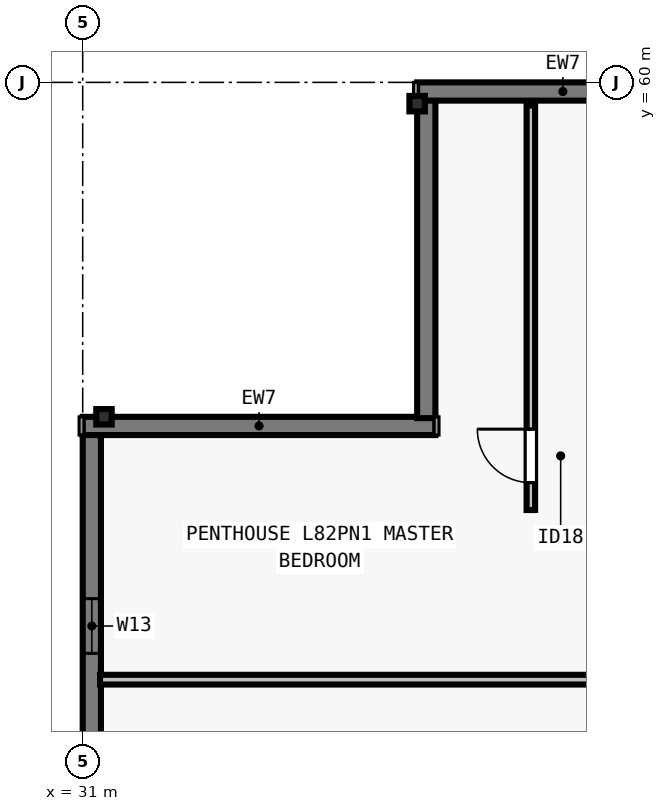
"""IFC4 building model, lengths in metres.
Left out: names, types, materials, properties, quantities, classifications, styles, units other than length and angle.
Written with IfcOpenShell. Run it as: python <this file> out.ifc"""

import sys

from ifc_helpers import new_model, si_unit, direction, frame, frame_2d, origin, origin_2d, place, context, subcontext, project, spatial, rectangle, i_section, extrude, element, fill, save


model = new_model("IFC4")
c1 = context("Model", 3, precision=1e-05, world=origin(), true_north=direction((0.0, 1.0)))
c2 = subcontext(c1, "Body", "Model", "MODEL_VIEW")
j1 = project(units=[si_unit("LENGTHUNIT", "METRE"), si_unit("PLANEANGLEUNIT", "RADIAN")], contexts=[c1])
p1 = place(None, origin())
s1 = spatial("IfcSite", under=j1, at=p1, CompositionType="ELEMENT")
p2 = place(p1, origin())
s2 = spatial("IfcBuilding", under=s1, at=p2, CompositionType="ELEMENT")
p3 = place(p2, frame((0.0, 0.0, 298.0)))
s3 = spatial("IfcBuildingStorey", under=s2, at=p3, CompositionType="ELEMENT", Elevation=298.0)
for number, where, z_axis, x_axis in (
    (1, (36.5, 59.65, 0.0), (0.0, 0.0, 1.0), (1.0, 0.0, 0.0)),
    (2, (31.35, 54.5, 0.0), (0.0, 0.0, 1.0), (0.0, 1.0, 0.0)),
):
    element("IfcColumn", number, at=place(p3, frame(where, z_axis=z_axis, x_axis=x_axis)), inside=s3, PredefinedType="COLUMN", context=c2, shape_type="SweptSolid", body=[
        extrude(i_section(OverallWidth=0.254, OverallDepth=0.254, WebThickness=0.009, FlangeThickness=0.014, FilletRadius=0.013, at=origin_2d()), origin(), (0.0, 0.0, 1.0), 3.5),
    ])
p4 = place(p3, frame((31.15, 23.5, 0.0), z_axis=(0.0, 0.0, 1.0), x_axis=(0.0, 1.0, 0.0)))
e3 = element("IfcWall", 3, at=p4, inside=s3, PredefinedType="SOLIDWALL", context=c2, shape_type="SweptSolid", body=[
    extrude(rectangle(XDim=30.722, YDim=0.3, at=frame_2d((15.361, 0.0))), origin(), (0.0, 0.0, 1.0), 3.29),
])
p5 = place(p4, frame((4.944, 0.0, 0.8)))
e4 = element("IfcOpeningElement", 4, at=p5, cuts=e3, PredefinedType="OPENING", context=c2, shape_type="SweptSolid", body=[
    extrude(rectangle(XDim=1.65, YDim=1.758, at=frame_2d((0.825, 0.879))), frame((0.0, 0.16, 0.0), z_axis=(0.0, -1.0, 0.0), x_axis=(1.0, 0.0, 0.0)), (0.0, 0.0, 1.0), 0.32),
])
p6 = place(p4, frame((7.355, 0.0, 0.8)))
e5 = element("IfcOpeningElement", 5, at=p6, cuts=e3, PredefinedType="OPENING", context=c2, shape_type="SweptSolid", body=[
    extrude(rectangle(XDim=2.0, YDim=1.758, at=frame_2d((1.0, 0.879))), frame((0.0, 0.16, 0.0), z_axis=(0.0, -1.0, 0.0), x_axis=(1.0, 0.0, 0.0)), (0.0, 0.0, 1.0), 0.32),
])
p7 = place(p4, frame((12.617, 0.0, 0.8)))
e6 = element("IfcOpeningElement", 6, at=p7, cuts=e3, PredefinedType="OPENING", context=c2, shape_type="SweptSolid", body=[
    extrude(rectangle(XDim=1.65, YDim=1.758, at=frame_2d((0.825, 0.879))), frame((0.0, 0.16, 0.0), z_axis=(0.0, -1.0, 0.0), x_axis=(1.0, 0.0, 0.0)), (0.0, 0.0, 1.0), 0.32),
])
p8 = place(p4, frame((16.28, 0.0, 0.8)))
e7 = element("IfcOpeningElement", 7, at=p8, cuts=e3, PredefinedType="OPENING", context=c2, shape_type="SweptSolid", body=[
    extrude(rectangle(XDim=2.0, YDim=1.758, at=frame_2d((1.0, 0.879))), frame((0.0, 0.16, 0.0), z_axis=(0.0, -1.0, 0.0), x_axis=(1.0, 0.0, 0.0)), (0.0, 0.0, 1.0), 0.32),
])
p9 = place(p4, frame((21.142, 0.0, 0.8)))
e8 = element("IfcOpeningElement", 8, at=p9, cuts=e3, PredefinedType="OPENING", context=c2, shape_type="SweptSolid", body=[
    extrude(rectangle(XDim=1.65, YDim=1.758, at=frame_2d((0.825, 0.879))), frame((0.0, 0.16, 0.0), z_axis=(0.0, -1.0, 0.0), x_axis=(1.0, 0.0, 0.0)), (0.0, 0.0, 1.0), 0.32),
])
p10 = place(p4, frame((27.11, 0.0, 0.8)))
e9 = element("IfcOpeningElement", 9, at=p10, cuts=e3, PredefinedType="OPENING", context=c2, shape_type="SweptSolid", body=[
    extrude(rectangle(XDim=0.9, YDim=1.75, at=frame_2d((0.45, 0.875))), frame((0.0, 0.16, 0.0), z_axis=(0.0, -1.0, 0.0), x_axis=(1.0, 0.0, 0.0)), (0.0, 0.0, 1.0), 0.32),
])
p11 = place(p3, frame((31.0, 54.35, 0.0), z_axis=(0.0, 0.0, 1.0), x_axis=(1.0, 0.0, 0.0)))
e10 = element("IfcWall", 10, at=p11, inside=s3, PredefinedType="SOLIDWALL", context=c2, shape_type="SweptSolid", body=[
    extrude(rectangle(XDim=5.8, YDim=0.3, at=frame_2d((2.9, 0.0))), origin(), (0.0, 0.0, 1.0), 3.29),
])
p12 = place(p3, frame((36.65, 54.478, 0.0), z_axis=(0.0, 0.0, 1.0), x_axis=(0.0, 1.0, 0.0)))
e11 = element("IfcWall", 11, at=p12, inside=s3, PredefinedType="SOLIDWALL", context=c2, shape_type="SweptSolid", body=[
    extrude(rectangle(XDim=5.244, YDim=0.3, at=frame_2d((2.622, 0.0))), origin(), (0.0, 0.0, 1.0), 3.29),
])
p13 = place(p3, frame((36.5, 59.85, 0.0), z_axis=(0.0, 0.0, 1.0), x_axis=(1.0, 0.0, 0.0)))
e12 = element("IfcWall", 12, at=p13, inside=s3, PredefinedType="SOLIDWALL", context=c2, shape_type="SweptSolid", body=[
    extrude(rectangle(XDim=30.722, YDim=0.3, at=frame_2d((15.361, 0.0))), origin(), (0.0, 0.0, 1.0), 3.29),
])
p14 = place(p13, frame((4.944, 0.0, 0.8)))
e13 = element("IfcOpeningElement", 13, at=p14, cuts=e12, PredefinedType="OPENING", context=c2, shape_type="SweptSolid", body=[
    extrude(rectangle(XDim=1.65, YDim=1.758, at=frame_2d((0.825, 0.879))), frame((0.0, 0.16, 0.0), z_axis=(0.0, -1.0, 0.0), x_axis=(1.0, 0.0, 0.0)), (0.0, 0.0, 1.0), 0.32),
])
p15 = place(p13, frame((7.756, 0.0, 0.8)))
e14 = element("IfcOpeningElement", 14, at=p15, cuts=e12, PredefinedType="OPENING", context=c2, shape_type="SweptSolid", body=[
    extrude(rectangle(XDim=2.0, YDim=1.758, at=frame_2d((1.0, 0.879))), frame((0.0, 0.16, 0.0), z_axis=(0.0, -1.0, 0.0), x_axis=(1.0, 0.0, 0.0)), (0.0, 0.0, 1.0), 0.32),
])
p16 = place(p13, frame((12.617, 0.0, 0.8)))
e15 = element("IfcOpeningElement", 15, at=p16, cuts=e12, PredefinedType="OPENING", context=c2, shape_type="SweptSolid", body=[
    extrude(rectangle(XDim=1.65, YDim=1.758, at=frame_2d((0.825, 0.879))), frame((0.0, 0.16, 0.0), z_axis=(0.0, -1.0, 0.0), x_axis=(1.0, 0.0, 0.0)), (0.0, 0.0, 1.0), 0.32),
])
p17 = place(p13, frame((17.53, 0.0, 0.8)))
e16 = element("IfcOpeningElement", 16, at=p17, cuts=e12, PredefinedType="OPENING", context=c2, shape_type="SweptSolid", body=[
    extrude(rectangle(XDim=2.0, YDim=1.758, at=frame_2d((1.0, 0.879))), frame((0.0, 0.16, 0.0), z_axis=(0.0, -1.0, 0.0), x_axis=(1.0, 0.0, 0.0)), (0.0, 0.0, 1.0), 0.32),
])
p18 = place(p13, frame((21.142, 0.0, 0.8)))
e17 = element("IfcOpeningElement", 17, at=p18, cuts=e12, PredefinedType="OPENING", context=c2, shape_type="SweptSolid", body=[
    extrude(rectangle(XDim=1.65, YDim=1.758, at=frame_2d((0.825, 0.879))), frame((0.0, 0.16, 0.0), z_axis=(0.0, -1.0, 0.0), x_axis=(1.0, 0.0, 0.0)), (0.0, 0.0, 1.0), 0.32),
])
p19 = place(p13, frame((23.954, 0.0, 0.8)))
e18 = element("IfcOpeningElement", 18, at=p19, cuts=e12, PredefinedType="OPENING", context=c2, shape_type="SweptSolid", body=[
    extrude(rectangle(XDim=2.0, YDim=1.758, at=frame_2d((1.0, 0.879))), frame((0.0, 0.16, 0.0), z_axis=(0.0, -1.0, 0.0), x_axis=(1.0, 0.0, 0.0)), (0.0, 0.0, 1.0), 0.32),
])
p20 = place(p3, frame((31.285, 50.177, 0.0), z_axis=(0.0, 0.0, 1.0), x_axis=(1.0, 0.0, 0.0)))
e19 = element("IfcWall", 19, at=p20, inside=s3, PredefinedType="PARTITIONING", context=c2, shape_type="SweptSolid", body=[
    extrude(rectangle(XDim=41.43, YDim=0.16, at=frame_2d((20.715, 0.0))), origin(), (0.0, 0.0, 1.0), 3.009),
])
p21 = place(p20, frame((20.235, 0.0, 0.0)))
e20 = element("IfcOpeningElement", 20, at=p21, cuts=e19, PredefinedType="OPENING", context=c2, shape_type="SweptSolid", body=[
    extrude(rectangle(XDim=0.96, YDim=2.18, at=frame_2d((0.48, 1.09))), frame((0.0, 0.09, 0.0), z_axis=(0.0, -1.0, 0.0), x_axis=(1.0, 0.0, 0.0)), (0.0, 0.0, 1.0), 0.18),
])
p22 = place(p3, frame((38.37, 52.968, 0.0), z_axis=(0.0, 0.0, 1.0), x_axis=(0.0, 1.0, 0.0)))
e21 = element("IfcWall", 21, at=p22, inside=s3, PredefinedType="PARTITIONING", context=c2, shape_type="SweptSolid", body=[
    extrude(rectangle(XDim=6.653, YDim=0.14, at=frame_2d((3.326, 0.0))), origin(), (0.0, 0.0, 1.0), 2.653),
])
p23 = place(p22, frame((0.45, 0.0, 0.0)))
e22 = element("IfcOpeningElement", 22, at=p23, cuts=e21, PredefinedType="OPENING", context=c2, shape_type="SweptSolid", body=[
    extrude(rectangle(XDim=0.88, YDim=2.1, at=frame_2d((0.44, 1.05))), frame((0.0, 0.08, 0.0), z_axis=(0.0, -1.0, 0.0), x_axis=(1.0, 0.0, 0.0)), (0.0, 0.0, 1.0), 0.16),
])
p24 = place(p10, origin())
e23 = element("IfcWindow", 23, at=p24, inside=s3, PartitioningType="SINGLE_PANEL", PredefinedType="WINDOW", context=c2, shape_type="SweptSolid", body=[
    extrude(rectangle(XDim=0.9, YDim=1.75, at=frame_2d((0.45, 0.875))), frame((0.0, -0.04, 0.0), z_axis=(0.0, -1.0, 0.0), x_axis=(1.0, 0.0, 0.0)), (0.0, 0.0, 1.0), 0.06),
])
fill(e9, e23)
p25 = place(p23, origin())
e24 = element("IfcDoor", 24, at=p25, inside=s3, OperationType="SINGLE_SWING_RIGHT", PredefinedType="DOOR", context=c2, shape_type="SweptSolid", body=[
    extrude(rectangle(XDim=0.88, YDim=2.1, at=frame_2d((0.44, 1.05))), frame((0.0, 0.025, 0.0), z_axis=(0.0, -1.0, 0.0), x_axis=(1.0, 0.0, 0.0)), (0.0, 0.0, 1.0), 0.05),
])
fill(e22, e24)
save(model, sys.argv[1])
